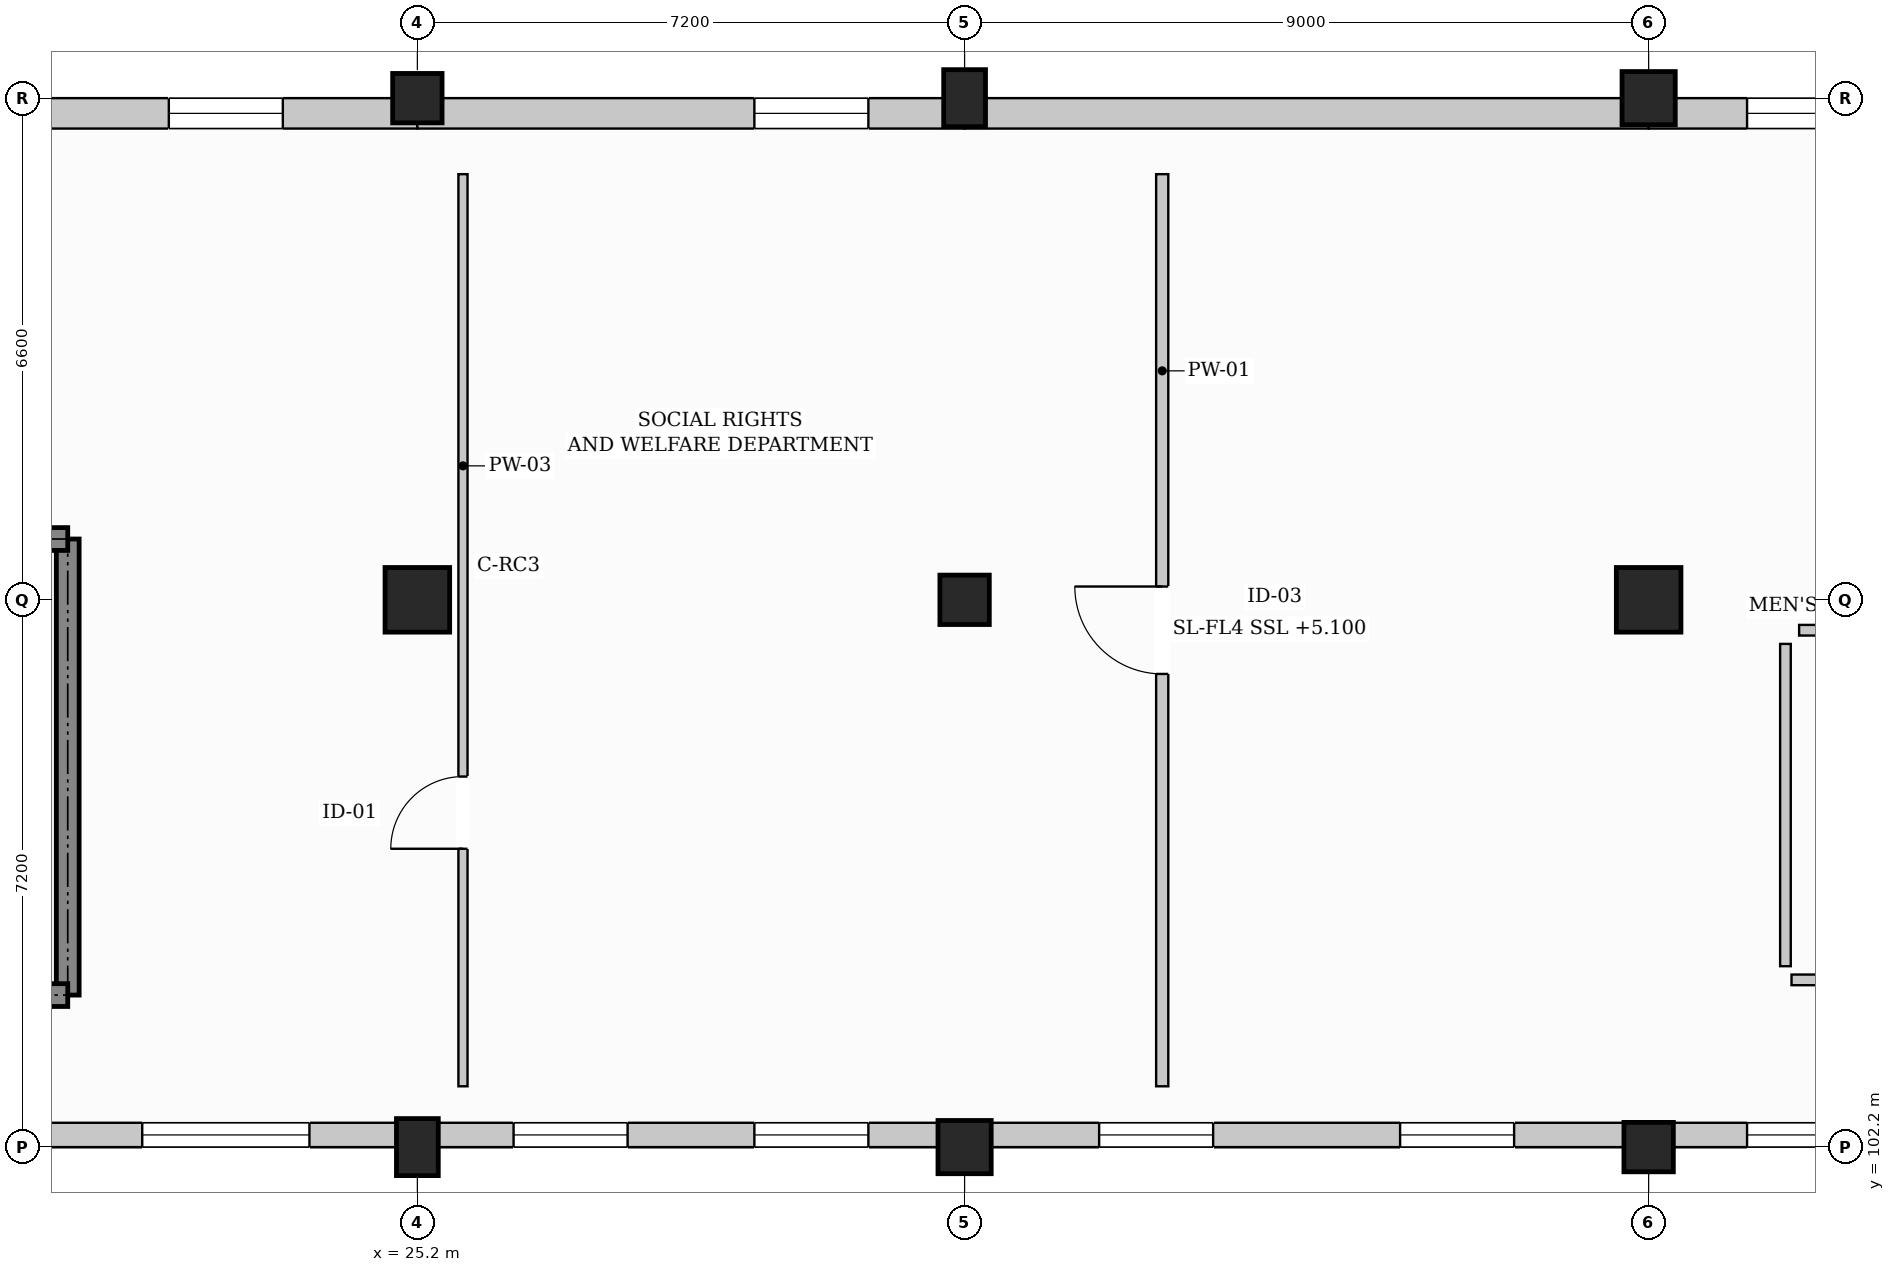
"""IFC4 building model, lengths in metres.
Left out: names, types, materials, properties, quantities, classifications, styles, units other than length and angle.
Written with IfcOpenShell. Run it as: python <this file> out.ifc"""

import sys

from ifc_helpers import new_model, si_unit, direction, frame, frame_2d, origin, origin_2d, place, context, subcontext, project, spatial, rectangle, extrude, element, fill, save


model = new_model("IFC4")
c1 = context("Model", 3, precision=1e-05, world=origin(), true_north=direction((0.0, 1.0)))
c2 = subcontext(c1, "Body", "Model", "MODEL_VIEW")
j1 = project(units=[si_unit("LENGTHUNIT", "METRE"), si_unit("PLANEANGLEUNIT", "RADIAN")], contexts=[c1])
p1 = place(None, origin())
s1 = spatial("IfcSite", under=j1, at=p1, CompositionType="ELEMENT")
p2 = place(p1, origin())
s2 = spatial("IfcBuilding", under=s1, at=p2, CompositionType="ELEMENT")
p3 = place(p2, frame((0.0, 0.0, 5.1)))
s3 = spatial("IfcBuildingStorey", under=s2, at=p3, CompositionType="ELEMENT", Elevation=5.1)
p4 = place(p3, frame((25.2, 102.2, 0.0), z_axis=(0.0, 0.0, 1.0), x_axis=(1.0, 0.0, 0.0)))
e1 = element("IfcColumn", 1, at=p4, inside=s3, PredefinedType="COLUMN", context=c2, shape_type="SweptSolid", body=[
    extrude(rectangle(XDim=0.55, YDim=0.75, at=origin_2d()), origin(), (0.0, 0.0, 1.0), 4.5),
])
p5 = place(p3, frame((25.2, 109.4, 0.0), z_axis=(0.0, 0.0, 1.0), x_axis=(1.0, 0.0, 0.0)))
e2 = element("IfcColumn", 2, at=p5, inside=s3, PredefinedType="COLUMN", context=c2, shape_type="SweptSolid", body=[
    extrude(rectangle(XDim=0.85, YDim=0.85, at=origin_2d()), origin(), (0.0, 0.0, 1.0), 4.5),
])
p6 = place(p3, frame((25.2, 116.0, 0.0), z_axis=(0.0, 0.0, 1.0), x_axis=(1.0, 0.0, 0.0)))
e3 = element("IfcColumn", 3, at=p6, inside=s3, PredefinedType="COLUMN", context=c2, shape_type="SweptSolid", body=[
    extrude(rectangle(XDim=0.65, YDim=0.65, at=origin_2d()), origin(), (0.0, 0.0, 1.0), 4.5),
])
p7 = place(p3, frame((32.4, 102.2, 0.0), z_axis=(0.0, 0.0, 1.0), x_axis=(1.0, 0.0, 0.0)))
e4 = element("IfcColumn", 4, at=p7, inside=s3, PredefinedType="COLUMN", context=c2, shape_type="SweptSolid", body=[
    extrude(rectangle(XDim=0.7, YDim=0.7, at=origin_2d()), origin(), (0.0, 0.0, 1.0), 4.5),
])
p8 = place(p3, frame((32.4, 109.4, 0.0), z_axis=(0.0, 0.0, 1.0), x_axis=(1.0, 0.0, 0.0)))
e5 = element("IfcColumn", 5, at=p8, inside=s3, PredefinedType="COLUMN", context=c2, shape_type="SweptSolid", body=[
    extrude(rectangle(XDim=0.65, YDim=0.65, at=origin_2d()), origin(), (0.0, 0.0, 1.0), 4.5),
])
p9 = place(p3, frame((32.4, 116.0, 0.0), z_axis=(0.0, 0.0, 1.0), x_axis=(1.0, 0.0, 0.0)))
e6 = element("IfcColumn", 6, at=p9, inside=s3, PredefinedType="COLUMN", context=c2, shape_type="SweptSolid", body=[
    extrude(rectangle(XDim=0.55, YDim=0.75, at=origin_2d()), origin(), (0.0, 0.0, 1.0), 4.5),
])
p10 = place(p3, frame((41.4, 102.2, 0.0), z_axis=(0.0, 0.0, 1.0), x_axis=(1.0, 0.0, 0.0)))
e7 = element("IfcColumn", 7, at=p10, inside=s3, PredefinedType="COLUMN", context=c2, shape_type="SweptSolid", body=[
    extrude(rectangle(XDim=0.65, YDim=0.65, at=origin_2d()), origin(), (0.0, 0.0, 1.0), 4.5),
])
p11 = place(p3, frame((41.4, 109.4, 0.0), z_axis=(0.0, 0.0, 1.0), x_axis=(1.0, 0.0, 0.0)))
e8 = element("IfcColumn", 8, at=p11, inside=s3, PredefinedType="COLUMN", context=c2, shape_type="SweptSolid", body=[
    extrude(rectangle(XDim=0.85, YDim=0.85, at=origin_2d()), origin(), (0.0, 0.0, 1.0), 4.5),
])
p12 = place(p3, frame((41.4, 116.0, 0.0), z_axis=(0.0, 0.0, 1.0), x_axis=(1.0, 0.0, 0.0)))
e9 = element("IfcColumn", 9, at=p12, inside=s3, PredefinedType="COLUMN", context=c2, shape_type="SweptSolid", body=[
    extrude(rectangle(XDim=0.7, YDim=0.7, at=origin_2d()), origin(), (0.0, 0.0, 1.0), 4.5),
])
p13 = place(p3, frame((16.2, 115.8, 0.0), z_axis=(0.0, 0.0, 1.0), x_axis=(1.0, 0.0, 0.0)))
e10 = element("IfcWall", 10, at=p13, inside=s3, PredefinedType="SOLIDWALL", context=c2, shape_type="SweptSolid", body=[
    extrude(rectangle(XDim=9.0, YDim=0.4, at=frame_2d((4.5, 0.0))), origin(), (0.0, 0.0, 1.0), 3.32),
])
p14 = place(p13, frame((1.77, 0.0, 0.75)))
e11 = element("IfcOpeningElement", 11, at=p14, cuts=e10, PredefinedType="OPENING", context=c2, shape_type="SweptSolid", body=[
    extrude(rectangle(XDim=1.5, YDim=1.6, at=frame_2d((0.75, 0.8))), frame((0.0, 0.21, 0.0), z_axis=(0.0, -1.0, 0.0), x_axis=(1.0, 0.0, 0.0)), (0.0, 0.0, 1.0), 0.42),
])
p15 = place(p13, frame((5.73, 0.0, 0.75)))
e12 = element("IfcOpeningElement", 12, at=p15, cuts=e10, PredefinedType="OPENING", context=c2, shape_type="SweptSolid", body=[
    extrude(rectangle(XDim=1.5, YDim=1.6, at=frame_2d((0.75, 0.8))), frame((0.0, 0.21, 0.0), z_axis=(0.0, -1.0, 0.0), x_axis=(1.0, 0.0, 0.0)), (0.0, 0.0, 1.0), 0.42),
])
p16 = place(p3, frame((25.2, 115.8, 0.0), z_axis=(0.0, 0.0, 1.0), x_axis=(1.0, 0.0, 0.0)))
e13 = element("IfcWall", 13, at=p16, inside=s3, PredefinedType="SOLIDWALL", context=c2, shape_type="SweptSolid", body=[
    extrude(rectangle(XDim=7.2, YDim=0.4, at=frame_2d((3.6, 0.0))), origin(), (0.0, 0.0, 1.0), 3.32),
])
p17 = place(p16, frame((4.434, 0.0, 0.75)))
e14 = element("IfcOpeningElement", 14, at=p17, cuts=e13, PredefinedType="OPENING", context=c2, shape_type="SweptSolid", body=[
    extrude(rectangle(XDim=1.5, YDim=1.6, at=frame_2d((0.75, 0.8))), frame((0.0, 0.21, 0.0), z_axis=(0.0, -1.0, 0.0), x_axis=(1.0, 0.0, 0.0)), (0.0, 0.0, 1.0), 0.42),
])
p18 = place(p3, frame((32.4, 115.8, 0.0), z_axis=(0.0, 0.0, 1.0), x_axis=(1.0, 0.0, 0.0)))
e15 = element("IfcWall", 15, at=p18, inside=s3, PredefinedType="SOLIDWALL", context=c2, shape_type="SweptSolid", body=[
    extrude(rectangle(XDim=9.0, YDim=0.4, at=frame_2d((4.5, 0.0))), origin(), (0.0, 0.0, 1.0), 3.5),
])
p19 = place(p3, frame((41.4, 115.8, 0.0), z_axis=(0.0, 0.0, 1.0), x_axis=(1.0, 0.0, 0.0)))
e16 = element("IfcWall", 16, at=p19, inside=s3, PredefinedType="SOLIDWALL", context=c2, shape_type="SweptSolid", body=[
    extrude(rectangle(XDim=9.0, YDim=0.4, at=frame_2d((4.5, 0.0))), origin(), (0.0, 0.0, 1.0), 3.47),
])
p20 = place(p19, frame((1.295, 0.0, 0.85)))
e17 = element("IfcOpeningElement", 17, at=p20, cuts=e16, PredefinedType="OPENING", context=c2, shape_type="SweptSolid", body=[
    extrude(rectangle(XDim=2.45, YDim=2.05, at=frame_2d((1.225, 1.025))), frame((0.0, 0.21, 0.0), z_axis=(0.0, -1.0, 0.0), x_axis=(1.0, 0.0, 0.0)), (0.0, 0.0, 1.0), 0.42),
])
p21 = place(p19, frame((5.255, 0.0, 0.85)))
e18 = element("IfcOpeningElement", 18, at=p21, cuts=e16, PredefinedType="OPENING", context=c2, shape_type="SweptSolid", body=[
    extrude(rectangle(XDim=2.45, YDim=2.05, at=frame_2d((1.225, 1.025))), frame((0.0, 0.21, 0.0), z_axis=(0.0, -1.0, 0.0), x_axis=(1.0, 0.0, 0.0)), (0.0, 0.0, 1.0), 0.42),
])
p22 = place(p3, frame((50.4, 102.36, 0.0), z_axis=(0.0, 0.0, 1.0), x_axis=(-1.0, 0.0, 0.0)))
e19 = element("IfcWall", 19, at=p22, inside=s3, PredefinedType="SOLIDWALL", context=c2, shape_type="SweptSolid", body=[
    extrude(rectangle(XDim=9.0, YDim=0.32, at=frame_2d((4.5, 0.0))), origin(), (0.0, 0.0, 1.0), 3.47),
])
p23 = place(p22, frame((1.295, 0.0, 0.85)))
e20 = element("IfcOpeningElement", 20, at=p23, cuts=e19, PredefinedType="OPENING", context=c2, shape_type="SweptSolid", body=[
    extrude(rectangle(XDim=2.45, YDim=2.05, at=frame_2d((1.225, 1.025))), frame((0.0, 0.17, 0.0), z_axis=(0.0, -1.0, 0.0), x_axis=(1.0, 0.0, 0.0)), (0.0, 0.0, 1.0), 0.34),
])
p24 = place(p22, frame((5.255, 0.0, 0.85)))
e21 = element("IfcOpeningElement", 21, at=p24, cuts=e19, PredefinedType="OPENING", context=c2, shape_type="SweptSolid", body=[
    extrude(rectangle(XDim=2.45, YDim=2.05, at=frame_2d((1.225, 1.025))), frame((0.0, 0.17, 0.0), z_axis=(0.0, -1.0, 0.0), x_axis=(1.0, 0.0, 0.0)), (0.0, 0.0, 1.0), 0.34),
])
p25 = place(p3, frame((41.4, 102.36, 0.0), z_axis=(0.0, 0.0, 1.0), x_axis=(-1.0, 0.0, 0.0)))
e22 = element("IfcWall", 22, at=p25, inside=s3, PredefinedType="SOLIDWALL", context=c2, shape_type="SweptSolid", body=[
    extrude(rectangle(XDim=9.0, YDim=0.32, at=frame_2d((4.5, 0.0))), origin(), (0.0, 0.0, 1.0), 3.37),
])
p26 = place(p25, frame((1.77, 0.0, 0.75)))
e23 = element("IfcOpeningElement", 23, at=p26, cuts=e22, PredefinedType="OPENING", context=c2, shape_type="SweptSolid", body=[
    extrude(rectangle(XDim=1.5, YDim=1.6, at=frame_2d((0.75, 0.8))), frame((0.0, 0.17, 0.0), z_axis=(0.0, -1.0, 0.0), x_axis=(1.0, 0.0, 0.0)), (0.0, 0.0, 1.0), 0.34),
])
p27 = place(p25, frame((5.73, 0.0, 0.75)))
e24 = element("IfcOpeningElement", 24, at=p27, cuts=e22, PredefinedType="OPENING", context=c2, shape_type="SweptSolid", body=[
    extrude(rectangle(XDim=1.5, YDim=1.6, at=frame_2d((0.75, 0.8))), frame((0.0, 0.17, 0.0), z_axis=(0.0, -1.0, 0.0), x_axis=(1.0, 0.0, 0.0)), (0.0, 0.0, 1.0), 0.34),
])
p28 = place(p3, frame((32.4, 102.36, 0.0), z_axis=(0.0, 0.0, 1.0), x_axis=(-1.0, 0.0, 0.0)))
e25 = element("IfcWall", 25, at=p28, inside=s3, PredefinedType="SOLIDWALL", context=c2, shape_type="SweptSolid", body=[
    extrude(rectangle(XDim=7.2, YDim=0.32, at=frame_2d((3.6, 0.0))), origin(), (0.0, 0.0, 1.0), 3.37),
])
p29 = place(p28, frame((1.266, 0.0, 0.75)))
e26 = element("IfcOpeningElement", 26, at=p29, cuts=e25, PredefinedType="OPENING", context=c2, shape_type="SweptSolid", body=[
    extrude(rectangle(XDim=1.5, YDim=1.6, at=frame_2d((0.75, 0.8))), frame((0.0, 0.17, 0.0), z_axis=(0.0, -1.0, 0.0), x_axis=(1.0, 0.0, 0.0)), (0.0, 0.0, 1.0), 0.34),
])
p30 = place(p28, frame((4.434, 0.0, 0.75)))
e27 = element("IfcOpeningElement", 27, at=p30, cuts=e25, PredefinedType="OPENING", context=c2, shape_type="SweptSolid", body=[
    extrude(rectangle(XDim=1.5, YDim=1.6, at=frame_2d((0.75, 0.8))), frame((0.0, 0.17, 0.0), z_axis=(0.0, -1.0, 0.0), x_axis=(1.0, 0.0, 0.0)), (0.0, 0.0, 1.0), 0.34),
])
p31 = place(p3, frame((25.2, 102.36, 0.0), z_axis=(0.0, 0.0, 1.0), x_axis=(-1.0, 0.0, 0.0)))
e28 = element("IfcWall", 28, at=p31, inside=s3, PredefinedType="SOLIDWALL", context=c2, shape_type="SweptSolid", body=[
    extrude(rectangle(XDim=9.0, YDim=0.32, at=frame_2d((4.5, 0.0))), origin(), (0.0, 0.0, 1.0), 3.47),
])
p32 = place(p31, frame((1.42, 0.0, 0.85)))
e29 = element("IfcOpeningElement", 29, at=p32, cuts=e28, PredefinedType="OPENING", context=c2, shape_type="SweptSolid", body=[
    extrude(rectangle(XDim=2.2, YDim=2.4, at=frame_2d((1.1, 1.2))), frame((0.0, 0.17, 0.0), z_axis=(0.0, -1.0, 0.0), x_axis=(1.0, 0.0, 0.0)), (0.0, 0.0, 1.0), 0.34),
])
p33 = place(p31, frame((5.38, 0.0, 0.85)))
e30 = element("IfcOpeningElement", 30, at=p33, cuts=e28, PredefinedType="OPENING", context=c2, shape_type="SweptSolid", body=[
    extrude(rectangle(XDim=2.2, YDim=2.4, at=frame_2d((1.1, 1.2))), frame((0.0, 0.17, 0.0), z_axis=(0.0, -1.0, 0.0), x_axis=(1.0, 0.0, 0.0)), (0.0, 0.0, 1.0), 0.34),
])
p34 = place(p3, frame((20.6, 104.2, 0.0), z_axis=(0.0, 0.0, 1.0), x_axis=(0.0, 1.0, 0.0)))
e31 = element("IfcWall", 31, at=p34, inside=s3, PredefinedType="SHEAR", context=c2, shape_type="SweptSolid", body=[
    extrude(rectangle(XDim=6.0, YDim=0.3, at=frame_2d((3.0, 0.0))), origin(), (0.0, 0.0, 1.0), 4.22),
])
for number, where, z_axis, x_axis in (
    (32, (13.6, 104.2, 0.0), (0.0, 0.0, 1.0), (1.0, 0.0, 0.0)),
    (33, (13.6, 110.2, 0.0), (0.0, 0.0, 1.0), (1.0, 0.0, 0.0)),
):
    element("IfcWall", number, at=place(p3, frame(where, z_axis=z_axis, x_axis=x_axis)), inside=s3, PredefinedType="SHEAR", context=c2, shape_type="SweptSolid", body=[
        extrude(rectangle(XDim=7.0, YDim=0.3, at=frame_2d((3.5, 0.0))), origin(), (0.0, 0.0, 1.0), 4.22),
    ])
p35 = place(p3, frame((43.38, 109.0, 0.0), z_axis=(0.0, 0.0, 1.0), x_axis=(1.0, 0.0, 0.0)))
e34 = element("IfcWall", 34, at=p35, inside=s3, PredefinedType="PARTITIONING", context=c2, shape_type="SweptSolid", body=[
    extrude(rectangle(XDim=6.24, YDim=0.14, at=frame_2d((3.12, 0.0))), origin(), (0.0, 0.0, 1.0), 4.0),
])
p36 = place(p3, frame((43.2, 104.58, 0.0), z_axis=(0.0, 0.0, 1.0), x_axis=(0.0, 1.0, 0.0)))
e35 = element("IfcWall", 35, at=p36, inside=s3, PredefinedType="PARTITIONING", context=c2, shape_type="SweptSolid", body=[
    extrude(rectangle(XDim=4.24, YDim=0.14, at=frame_2d((2.12, 0.0))), origin(), (0.0, 0.0, 1.0), 4.22),
])
p37 = place(p3, frame((43.28, 104.4, 0.0), z_axis=(0.0, 0.0, 1.0), x_axis=(1.0, 0.0, 0.0)))
e36 = element("IfcWall", 36, at=p37, inside=s3, PredefinedType="PARTITIONING", context=c2, shape_type="SweptSolid", body=[
    extrude(rectangle(XDim=2.216, YDim=0.14, at=frame_2d((1.108, 0.0))), origin(), (0.0, 0.0, 1.0), 4.22),
])
p38 = place(p37, frame((0.608, 0.0, 0.0)))
e37 = element("IfcOpeningElement", 37, at=p38, cuts=e36, PredefinedType="OPENING", context=c2, shape_type="SweptSolid", body=[
    extrude(rectangle(XDim=1.0, YDim=2.15, at=frame_2d((0.5, 1.075))), frame((0.0, 0.08, 0.0), z_axis=(0.0, -1.0, 0.0), x_axis=(1.0, 0.0, 0.0)), (0.0, 0.0, 1.0), 0.16),
])
p39 = place(p3, frame((35.0, 103.0, 0.0), z_axis=(0.0, 0.0, 1.0), x_axis=(0.0, 1.0, 0.0)))
e38 = element("IfcWall", 38, at=p39, inside=s3, PredefinedType="PARTITIONING", context=c2, shape_type="SweptSolid", body=[
    extrude(rectangle(XDim=12.0, YDim=0.16, at=frame_2d((6.0, 0.0))), origin(), (0.0, 0.0, 1.0), 3.67),
])
p40 = place(p39, frame((5.425, 0.0, 0.0)))
e39 = element("IfcOpeningElement", 39, at=p40, cuts=e38, PredefinedType="OPENING", context=c2, shape_type="SweptSolid", body=[
    extrude(rectangle(XDim=1.15, YDim=2.2, at=frame_2d((0.575, 1.1))), frame((0.0, 0.09, 0.0), z_axis=(0.0, -1.0, 0.0), x_axis=(1.0, 0.0, 0.0)), (0.0, 0.0, 1.0), 0.18),
])
p41 = place(p3, frame((25.8, 103.0, 0.0), z_axis=(0.0, 0.0, 1.0), x_axis=(0.0, 1.0, 0.0)))
e40 = element("IfcWall", 40, at=p41, inside=s3, PredefinedType="PARTITIONING", context=c2, shape_type="SweptSolid", body=[
    extrude(rectangle(XDim=12.0, YDim=0.12, at=frame_2d((6.0, 0.0))), origin(), (0.0, 0.0, 1.0), 3.77),
])
p42 = place(p41, frame((3.125, 0.0, 0.0)))
e41 = element("IfcOpeningElement", 41, at=p42, cuts=e40, PredefinedType="OPENING", context=c2, shape_type="SweptSolid", body=[
    extrude(rectangle(XDim=0.95, YDim=2.15, at=frame_2d((0.475, 1.075))), frame((0.0, 0.07, 0.0), z_axis=(0.0, -1.0, 0.0), x_axis=(1.0, 0.0, 0.0)), (0.0, 0.0, 1.0), 0.14),
])
p43 = place(p15, origin())
e42 = element("IfcWindow", 42, at=p43, inside=s3, PartitioningType="DOUBLE_PANEL_HORIZONTAL", PredefinedType="WINDOW", context=c2, shape_type="SweptSolid", body=[
    extrude(rectangle(XDim=1.5, YDim=1.6, at=frame_2d((0.75, 0.8))), frame((0.0, 0.03, 0.0), z_axis=(0.0, -1.0, 0.0), x_axis=(1.0, 0.0, 0.0)), (0.0, 0.0, 1.0), 0.06),
])
fill(e12, e42)
p44 = place(p17, origin())
e43 = element("IfcWindow", 43, at=p44, inside=s3, PartitioningType="DOUBLE_PANEL_HORIZONTAL", PredefinedType="WINDOW", context=c2, shape_type="SweptSolid", body=[
    extrude(rectangle(XDim=1.5, YDim=1.6, at=frame_2d((0.75, 0.8))), frame((0.0, 0.03, 0.0), z_axis=(0.0, -1.0, 0.0), x_axis=(1.0, 0.0, 0.0)), (0.0, 0.0, 1.0), 0.06),
])
fill(e14, e43)
p45 = place(p20, origin())
e44 = element("IfcWindow", 44, at=p45, inside=s3, PartitioningType="TRIPLE_PANEL_VERTICAL", PredefinedType="WINDOW", context=c2, shape_type="SweptSolid", body=[
    extrude(rectangle(XDim=2.45, YDim=2.05, at=frame_2d((1.225, 1.025))), frame((0.0, 0.03, 0.0), z_axis=(0.0, -1.0, 0.0), x_axis=(1.0, 0.0, 0.0)), (0.0, 0.0, 1.0), 0.06),
])
fill(e17, e44)
p46 = place(p24, origin())
e45 = element("IfcWindow", 45, at=p46, inside=s3, PartitioningType="TRIPLE_PANEL_VERTICAL", PredefinedType="WINDOW", context=c2, shape_type="SweptSolid", body=[
    extrude(rectangle(XDim=2.45, YDim=2.05, at=frame_2d((1.225, 1.025))), frame((0.0, 0.03, 0.0), z_axis=(0.0, -1.0, 0.0), x_axis=(1.0, 0.0, 0.0)), (0.0, 0.0, 1.0), 0.06),
])
fill(e21, e45)
p47 = place(p26, origin())
e46 = element("IfcWindow", 46, at=p47, inside=s3, PartitioningType="DOUBLE_PANEL_HORIZONTAL", PredefinedType="WINDOW", context=c2, shape_type="SweptSolid", body=[
    extrude(rectangle(XDim=1.5, YDim=1.6, at=frame_2d((0.75, 0.8))), frame((0.0, 0.03, 0.0), z_axis=(0.0, -1.0, 0.0), x_axis=(1.0, 0.0, 0.0)), (0.0, 0.0, 1.0), 0.06),
])
fill(e23, e46)
p48 = place(p27, origin())
e47 = element("IfcWindow", 47, at=p48, inside=s3, PartitioningType="DOUBLE_PANEL_HORIZONTAL", PredefinedType="WINDOW", context=c2, shape_type="SweptSolid", body=[
    extrude(rectangle(XDim=1.5, YDim=1.6, at=frame_2d((0.75, 0.8))), frame((0.0, 0.03, 0.0), z_axis=(0.0, -1.0, 0.0), x_axis=(1.0, 0.0, 0.0)), (0.0, 0.0, 1.0), 0.06),
])
fill(e24, e47)
p49 = place(p29, origin())
e48 = element("IfcWindow", 48, at=p49, inside=s3, PartitioningType="DOUBLE_PANEL_HORIZONTAL", PredefinedType="WINDOW", context=c2, shape_type="SweptSolid", body=[
    extrude(rectangle(XDim=1.5, YDim=1.6, at=frame_2d((0.75, 0.8))), frame((0.0, 0.03, 0.0), z_axis=(0.0, -1.0, 0.0), x_axis=(1.0, 0.0, 0.0)), (0.0, 0.0, 1.0), 0.06),
])
fill(e26, e48)
p50 = place(p30, origin())
e49 = element("IfcWindow", 49, at=p50, inside=s3, PartitioningType="DOUBLE_PANEL_HORIZONTAL", PredefinedType="WINDOW", context=c2, shape_type="SweptSolid", body=[
    extrude(rectangle(XDim=1.5, YDim=1.6, at=frame_2d((0.75, 0.8))), frame((0.0, 0.03, 0.0), z_axis=(0.0, -1.0, 0.0), x_axis=(1.0, 0.0, 0.0)), (0.0, 0.0, 1.0), 0.06),
])
fill(e27, e49)
p51 = place(p32, origin())
e50 = element("IfcWindow", 50, at=p51, inside=s3, PartitioningType="DOUBLE_PANEL_VERTICAL", PredefinedType="WINDOW", context=c2, shape_type="SweptSolid", body=[
    extrude(rectangle(XDim=2.2, YDim=2.4, at=frame_2d((1.1, 1.2))), frame((0.0, 0.03, 0.0), z_axis=(0.0, -1.0, 0.0), x_axis=(1.0, 0.0, 0.0)), (0.0, 0.0, 1.0), 0.06),
])
fill(e29, e50)
p52 = place(p40, origin())
e51 = element("IfcDoor", 51, at=p52, inside=s3, OperationType="SINGLE_SWING_RIGHT", PredefinedType="DOOR", context=c2, shape_type="SweptSolid", body=[
    extrude(rectangle(XDim=1.15, YDim=2.2, at=frame_2d((0.575, 1.1))), frame((0.0, 0.025, 0.0), z_axis=(0.0, -1.0, 0.0), x_axis=(1.0, 0.0, 0.0)), (0.0, 0.0, 1.0), 0.05),
])
fill(e39, e51)
p53 = place(p42, origin())
e52 = element("IfcDoor", 52, at=p53, inside=s3, OperationType="SINGLE_SWING_LEFT", PredefinedType="DOOR", context=c2, shape_type="SweptSolid", body=[
    extrude(rectangle(XDim=0.95, YDim=2.15, at=frame_2d((0.475, 1.075))), frame((0.0, 0.025, 0.0), z_axis=(0.0, -1.0, 0.0), x_axis=(1.0, 0.0, 0.0)), (0.0, 0.0, 1.0), 0.05),
])
fill(e41, e52)
save(model, sys.argv[1])
